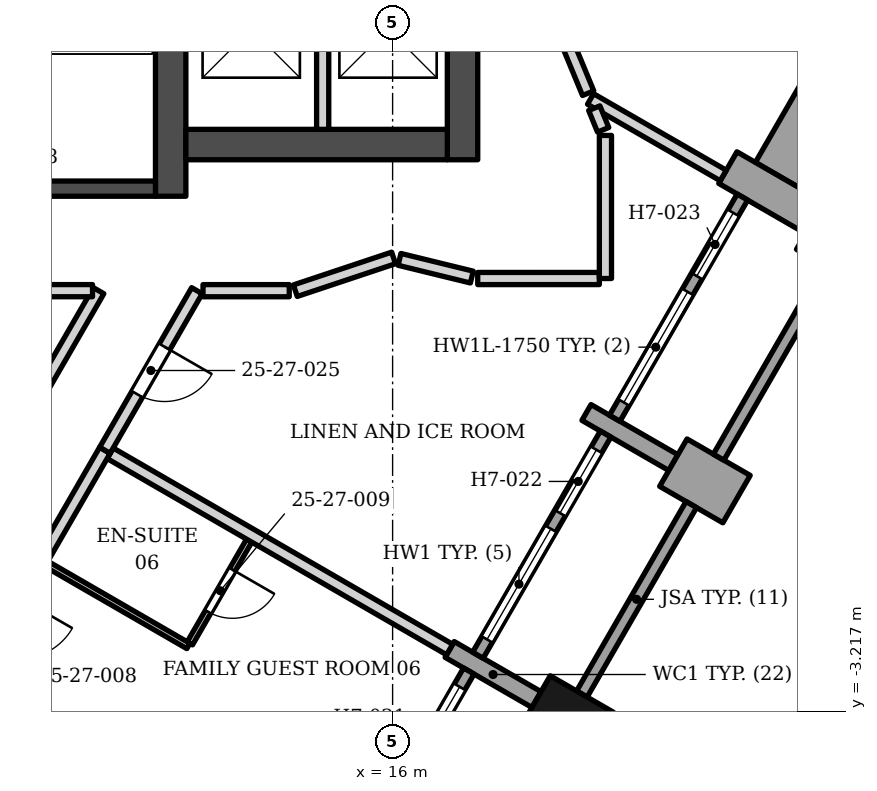
"""IFC4 building model, lengths in metres.
Left out: names, types, materials, properties, quantities, classifications, styles, units other than length and angle.
Written with IfcOpenShell. Run it as: python <this file> out.ifc"""

import sys

from ifc_helpers import new_model, si_unit, direction, frame, frame_2d, origin, origin_2d, place, context, subcontext, project, spatial, polyline, rectangle, outline, extrude, element, fill, save


model = new_model("IFC4")
c1 = context("Model", 3, precision=1e-05, world=origin(), true_north=direction((0.0, 1.0)))
c2 = subcontext(c1, "Body", "Model", "MODEL_VIEW")
j1 = project(units=[si_unit("LENGTHUNIT", "METRE"), si_unit("PLANEANGLEUNIT", "RADIAN")], contexts=[c1])
p1 = place(None, origin())
s1 = spatial("IfcSite", under=j1, at=p1, CompositionType="ELEMENT")
p2 = place(p1, origin())
s2 = spatial("IfcBuilding", under=s1, at=p2, CompositionType="ELEMENT")
p3 = place(p2, frame((0.0, 0.0, 112.2)))
s3 = spatial("IfcBuildingStorey", under=s2, at=p3, CompositionType="ELEMENT", Elevation=112.2)
p4 = place(p3, frame((12.35, 5.253, 0.0), z_axis=(0.0, 0.0, 1.0), x_axis=(0.0, 1.0, 0.0)))
e1 = element("IfcWall", 1, at=p4, inside=s3, PredefinedType="SHEAR", context=c2, shape_type="SweptSolid", body=[
    extrude(rectangle(XDim=13.3, YDim=0.5, at=frame_2d((6.65, 0.0))), origin(), (0.0, 0.0, 1.0), 3.4),
])
p5 = place(p3, frame((8.35, 5.378, 0.0), z_axis=(0.0, 0.0, 1.0), x_axis=(1.0, 0.0, 0.0)))
e2 = element("IfcWall", 2, at=p5, inside=s3, PredefinedType="SHEAR", context=c2, shape_type="SweptSolid", body=[
    extrude(rectangle(XDim=3.75, YDim=0.25, at=frame_2d((1.875, 0.0))), origin(), (0.0, 0.0, 1.0), 3.4),
])
p6 = place(p3, frame((12.6, 6.103, 0.0), z_axis=(0.0, 0.0, 1.0), x_axis=(1.0, 0.0, 0.0)))
e3 = element("IfcWall", 3, at=p6, inside=s3, PredefinedType="SHEAR", context=c2, shape_type="SweptSolid", body=[
    extrude(rectangle(XDim=4.3, YDim=0.5, at=frame_2d((2.15, 0.0))), origin(), (0.0, 0.0, 1.0), 3.4),
])
p7 = place(p3, frame((17.15, 5.853, 0.0), z_axis=(0.0, 0.0, 1.0), x_axis=(0.0, 1.0, 0.0)))
e4 = element("IfcWall", 4, at=p7, inside=s3, PredefinedType="SHEAR", context=c2, shape_type="SweptSolid", body=[
    extrude(rectangle(XDim=13.2, YDim=0.5, at=frame_2d((6.6, 0.0))), origin(), (0.0, 0.0, 1.0), 3.4),
])
p8 = place(p7, frame((4.1, 0.0, 0.0)))
e5 = element("IfcOpeningElement", 5, at=p8, cuts=e4, PredefinedType="OPENING", context=c2, shape_type="SweptSolid", body=[
    extrude(rectangle(XDim=1.6, YDim=2.1, at=frame_2d((0.8, 1.05))), frame((0.0, 0.26, 0.0), z_axis=(0.0, -1.0, 0.0), x_axis=(1.0, 0.0, 0.0)), (0.0, 0.0, 1.0), 0.52),
])
p9 = place(p7, frame((10.15, 0.0, 0.0)))
e6 = element("IfcOpeningElement", 6, at=p9, cuts=e4, PredefinedType="OPENING", context=c2, shape_type="SweptSolid", body=[
    extrude(rectangle(XDim=0.9, YDim=2.1, at=frame_2d((0.45, 1.05))), frame((0.0, 0.26, 0.0), z_axis=(0.0, -1.0, 0.0), x_axis=(1.0, 0.0, 0.0)), (0.0, 0.0, 1.0), 0.52),
])
for number, where, z_axis, x_axis in (
    (7, (18.887, -3.323, 0.0), (0.0, 0.0, 1.0), (0.5, 0.866, 0.0)),
    (8, (23.387, 4.469, 0.0), (0.0, 0.0, 1.0), (0.5, 0.866, 0.0)),
):
    element("IfcColumn", number, at=place(p3, frame(where, z_axis=z_axis, x_axis=x_axis)), inside=s3, PredefinedType="COLUMN", context=c2, shape_type="SweptSolid", body=[
        extrude(rectangle(XDim=0.9, YDim=1.2, at=origin_2d()), origin(), (0.0, 0.0, 1.0), 3.4),
    ])
p10 = place(p3, frame((18.366, -3.025, 0.0), z_axis=(0.0, 0.0, 1.0), x_axis=(-0.866057395165, 0.499944585209, 0.0)))
e9 = element("IfcWall", 9, at=p10, inside=s3, PredefinedType="SOLIDWALL", context=c2, shape_type="SweptSolid", body=[
    extrude(rectangle(XDim=1.649, YDim=0.3, at=frame_2d((0.825, 0.0))), origin(), (0.0, 0.0, 1.0), 2.65),
])
p11 = place(p3, frame((21.656, 0.272, 0.0), z_axis=(0.0, 0.0, 1.0), x_axis=(-0.866094119867, 0.499880961361, 0.0)))
e10 = element("IfcWall", 10, at=p11, inside=s3, PredefinedType="SOLIDWALL", context=c2, shape_type="SweptSolid", body=[
    extrude(rectangle(XDim=1.2, YDim=0.9, at=frame_2d((0.6, 0.0))), origin(), (0.0, 0.0, 1.0), 2.63),
])
p12 = place(p3, frame((20.617, 0.872, 0.0), z_axis=(0.0, 0.0, 1.0), x_axis=(-0.866040211805, 0.499974350878, 0.0)))
e11 = element("IfcWall", 11, at=p12, inside=s3, PredefinedType="SOLIDWALL", context=c2, shape_type="SweptSolid", body=[
    extrude(rectangle(XDim=1.65, YDim=0.3, at=frame_2d((0.825, 0.0))), origin(), (0.0, 0.0, 1.0), 2.65),
])
p13 = place(p3, frame((22.942, 4.899, 0.0), z_axis=(0.0, 0.0, 1.0), x_axis=(-0.866003217194, 0.500038426333, 0.0)))
e12 = element("IfcWall", 12, at=p13, inside=s3, PredefinedType="SOLIDWALL", context=c2, shape_type="SweptSolid", body=[
    extrude(rectangle(XDim=1.65, YDim=0.6, at=frame_2d((0.825, 0.0))), origin(), (0.0, 0.0, 1.0), 2.45),
])
p14 = place(p3, frame((15.153, -6.192, 0.0), z_axis=(0.0, 0.0, 1.0), x_axis=(0.49998411664, 0.866034573852, 0.0)))
e13 = element("IfcWall", 13, at=p14, inside=s3, PredefinedType="ELEMENTEDWALL", context=c2, shape_type="SweptSolid", body=[
    extrude(rectangle(XDim=4.2, YDim=0.2, at=frame_2d((2.1, 0.0))), origin(), (0.0, 0.0, 1.0), 2.65),
])
p15 = place(p14, frame((0.3, 0.0, 0.6)))
e14 = element("IfcOpeningElement", 14, at=p15, cuts=e13, PredefinedType="OPENING", context=c2, shape_type="SweptSolid", body=[
    extrude(rectangle(XDim=2.1, YDim=1.8, at=frame_2d((1.05, 0.9))), frame((0.0, 0.11, 0.0), z_axis=(0.0, -1.0, 0.0), x_axis=(1.0, 0.0, 0.0)), (0.0, 0.0, 1.0), 0.22),
])
p16 = place(p14, frame((2.7, 0.0, 0.0)))
e15 = element("IfcOpeningElement", 15, at=p16, cuts=e13, PredefinedType="OPENING", context=c2, shape_type="SweptSolid", body=[
    extrude(rectangle(XDim=1.2, YDim=2.4, at=frame_2d((0.6, 1.2))), frame((0.0, 0.11, 0.0), z_axis=(0.0, -1.0, 0.0), x_axis=(1.0, 0.0, 0.0)), (0.0, 0.0, 1.0), 0.22),
])
p17 = place(p3, origin())
e16 = element("IfcWall", 16, at=p17, inside=s3, PredefinedType="SOLIDWALL", context=c2, shape_type="SweptSolid", body=[
    extrude(outline(polyline([(20.825, 0.232), (19.026, -2.884), (19.199, -2.984), (20.999, 0.132), (20.825, 0.232)])), origin(), (0.0, 0.0, 1.0), 2.63),
])
p18 = place(p3, frame((17.403, -2.295, 0.0), z_axis=(0.0, 0.0, 1.0), x_axis=(0.499958946799, 0.866049104564, 0.0)))
e17 = element("IfcWall", 17, at=p18, inside=s3, PredefinedType="ELEMENTEDWALL", context=c2, shape_type="SweptSolid", body=[
    extrude(rectangle(XDim=4.2, YDim=0.2, at=frame_2d((2.1, 0.0))), origin(), (0.0, 0.0, 1.0), 2.65),
])
p19 = place(p18, frame((0.3, 0.0, 0.6)))
e18 = element("IfcOpeningElement", 18, at=p19, cuts=e17, PredefinedType="OPENING", context=c2, shape_type="SweptSolid", body=[
    extrude(rectangle(XDim=2.1, YDim=1.8, at=frame_2d((1.05, 0.9))), frame((0.0, 0.11, 0.0), z_axis=(0.0, -1.0, 0.0), x_axis=(1.0, 0.0, 0.0)), (0.0, 0.0, 1.0), 0.22),
])
p20 = place(p18, frame((2.7, 0.0, 0.0)))
e19 = element("IfcOpeningElement", 19, at=p20, cuts=e17, PredefinedType="OPENING", context=c2, shape_type="SweptSolid", body=[
    extrude(rectangle(XDim=1.2, YDim=2.4, at=frame_2d((0.6, 1.2))), frame((0.0, 0.11, 0.0), z_axis=(0.0, -1.0, 0.0), x_axis=(1.0, 0.0, 0.0)), (0.0, 0.0, 1.0), 0.22),
])
p21 = place(p3, frame((21.362, 0.962, 0.0), z_axis=(0.0, 0.0, 1.0), x_axis=(0.500012057535, 0.866018442252, 0.0)))
e20 = element("IfcWall", 20, at=p21, inside=s3, PredefinedType="SOLIDWALL", context=c2, shape_type="SweptSolid", body=[
    extrude(rectangle(XDim=3.6, YDim=0.2, at=frame_2d((1.8, 0.0))), origin(), (0.0, 0.0, 1.0), 2.63),
])
p22 = place(p3, frame((19.653, 1.602, 0.0), z_axis=(0.0, 0.0, 1.0), x_axis=(0.49998411664, 0.866034573852, 0.0)))
e21 = element("IfcWall", 21, at=p22, inside=s3, PredefinedType="ELEMENTEDWALL", context=c2, shape_type="SweptSolid", body=[
    extrude(rectangle(XDim=4.2, YDim=0.2, at=frame_2d((2.1, 0.0))), origin(), (0.0, 0.0, 1.0), 2.45),
])
p23 = place(p22, frame((0.3, 0.0, 0.6)))
e22 = element("IfcOpeningElement", 22, at=p23, cuts=e21, PredefinedType="OPENING", context=c2, shape_type="SweptSolid", body=[
    extrude(rectangle(XDim=2.1, YDim=1.75, at=frame_2d((1.05, 0.875))), frame((0.0, 0.11, 0.0), z_axis=(0.0, -1.0, 0.0), x_axis=(1.0, 0.0, 0.0)), (0.0, 0.0, 1.0), 0.22),
])
p24 = place(p22, frame((2.7, 0.0, 0.0)))
e23 = element("IfcOpeningElement", 23, at=p24, cuts=e21, PredefinedType="OPENING", context=c2, shape_type="SweptSolid", body=[
    extrude(rectangle(XDim=1.2, YDim=2.35, at=frame_2d((0.6, 1.175))), frame((0.0, 0.11, 0.0), z_axis=(0.0, -1.0, 0.0), x_axis=(1.0, 0.0, 0.0)), (0.0, 0.0, 1.0), 0.22),
])
p25 = place(p3, origin())
e24 = element("IfcWall", 24, at=p25, inside=s3, PredefinedType="SOLIDWALL", context=c2, shape_type="SweptSolid", body=[
    extrude(outline(polyline([(21.966, 5.809), (23.092, 5.159), (23.092, 5.159), (24.132, 4.559), (25.326, 6.628), (23.161, 7.878), (21.966, 5.809)])), origin(), (0.0, 0.0, 1.0), 2.552),
])
p26 = place(p3, frame((14.85, 6.353, 0.0), z_axis=(0.0, 0.0, 1.0), x_axis=(0.0, 1.0, 0.0)))
e25 = element("IfcWall", 25, at=p26, inside=s3, PredefinedType="SOLIDWALL", context=c2, shape_type="SweptSolid", body=[
    extrude(rectangle(XDim=2.5, YDim=0.2, at=frame_2d((1.25, 0.0))), origin(), (0.0, 0.0, 1.0), 3.23),
])
p27 = place(p3, frame((6.348, -4.639, 0.0), z_axis=(0.0, 0.0, 1.0), x_axis=(0.500160597015, 0.865932663198, 0.0)))
e26 = element("IfcWall", 26, at=p27, inside=s3, PredefinedType="PARTITIONING", context=c2, shape_type="SweptSolid", body=[
    extrude(rectangle(XDim=9.63, YDim=0.2, at=frame_2d((4.815, 0.0))), origin(), (0.0, 0.0, 1.0), 2.552),
])
p28 = place(p27, frame((4.315, 0.0, 0.0)))
e27 = element("IfcOpeningElement", 27, at=p28, cuts=e26, PredefinedType="OPENING", context=c2, shape_type="SweptSolid", body=[
    extrude(rectangle(XDim=1.0, YDim=2.1, at=frame_2d((0.5, 1.05))), frame((0.0, 0.11, 0.0), z_axis=(0.0, -1.0, 0.0), x_axis=(1.0, 0.0, 0.0)), (0.0, 0.0, 1.0), 0.22),
])
p29 = place(p3, frame((9.104, -2.871, 0.0), z_axis=(0.0, 0.0, 1.0), x_axis=(0.865901871826, -0.500213902613, 0.0)))
e28 = element("IfcWall", 28, at=p29, inside=s3, PredefinedType="PARTITIONING", context=c2, shape_type="SweptSolid", body=[
    extrude(rectangle(XDim=6.45, YDim=0.2, at=frame_2d((3.225, 0.0))), origin(), (0.0, 0.0, 1.0), 2.384),
])
p30 = place(p29, frame((4.25, 0.0, 0.0)))
e29 = element("IfcOpeningElement", 29, at=p30, cuts=e28, PredefinedType="OPENING", context=c2, shape_type="SweptSolid", body=[
    extrude(rectangle(XDim=0.9, YDim=2.1, at=frame_2d((0.45, 1.05))), frame((0.0, 0.11, 0.0), z_axis=(0.0, -1.0, 0.0), x_axis=(1.0, 0.0, 0.0)), (0.0, 0.0, 1.0), 0.22),
])
p31 = place(p3, frame((12.666, -2.101, 0.0), z_axis=(0.0, 0.0, 1.0), x_axis=(0.49995005938, 0.866054235095, 0.0)))
e30 = element("IfcWall", 30, at=p31, inside=s3, PredefinedType="PARTITIONING", context=c2, shape_type="SweptSolid", body=[
    extrude(rectangle(XDim=1.95, YDim=0.1, at=frame_2d((0.975, 0.0))), origin(), (0.0, 0.0, 1.0), 2.384),
])
p32 = place(p31, frame((0.6, 0.0, 0.0)))
e31 = element("IfcOpeningElement", 31, at=p32, cuts=e30, PredefinedType="OPENING", context=c2, shape_type="SweptSolid", body=[
    extrude(rectangle(XDim=0.8, YDim=2.1, at=frame_2d((0.4, 1.05))), frame((0.0, 0.06, 0.0), z_axis=(0.0, -1.0, 0.0), x_axis=(1.0, 0.0, 0.0)), (0.0, 0.0, 1.0), 0.12),
])
p33 = place(p3, frame((10.303, -0.792, 0.0), z_axis=(0.0, 0.0, 1.0), x_axis=(0.86571095196, -0.500544251447, 0.0)))
e32 = element("IfcWall", 32, at=p33, inside=s3, PredefinedType="PARTITIONING", context=c2, shape_type="SweptSolid", body=[
    extrude(rectangle(XDim=2.7, YDim=0.1, at=frame_2d((1.35, 0.0))), origin(), (0.0, 0.0, 1.0), 3.23),
])
p34 = place(p3, frame((11.355, 1.025, 0.0), z_axis=(0.0, 0.0, 1.0), x_axis=(0.865748417306, -0.500479448062, 0.0)))
e33 = element("IfcWall", 33, at=p34, inside=s3, PredefinedType="PARTITIONING", context=c2, shape_type="SweptSolid", body=[
    extrude(rectangle(XDim=6.448, YDim=0.2, at=frame_2d((3.224, 0.0))), origin(), (0.0, 0.0, 1.0), 2.384),
])
p35 = place(p3, frame((0.018, -18.412, 0.0), z_axis=(0.0, 0.0, 1.0), x_axis=(0.49999953585, 0.866025671762, 0.0)))
e34 = element("IfcWall", 34, at=p35, inside=s3, PredefinedType="PARTITIONING", context=c2, shape_type="SweptSolid", body=[
    extrude(rectangle(XDim=22.5, YDim=0.2, at=frame_2d((11.25, 0.0))), origin(), (0.0, 0.0, 1.0), 2.374),
])
p36 = place(p35, frame((4.0, 0.0, 0.0)))
e35 = element("IfcOpeningElement", 35, at=p36, cuts=e34, PredefinedType="OPENING", context=c2, shape_type="SweptSolid", body=[
    extrude(rectangle(XDim=1.0, YDim=2.1, at=frame_2d((0.5, 1.05))), frame((0.0, 0.11, 0.0), z_axis=(0.0, -1.0, 0.0), x_axis=(1.0, 0.0, 0.0)), (0.0, 0.0, 1.0), 0.22),
])
p37 = place(p35, frame((9.5, 0.0, 0.0)))
e36 = element("IfcOpeningElement", 36, at=p37, cuts=e34, PredefinedType="OPENING", context=c2, shape_type="SweptSolid", body=[
    extrude(rectangle(XDim=1.1, YDim=2.1, at=frame_2d((0.55, 1.05))), frame((0.0, 0.11, 0.0), z_axis=(0.0, -1.0, 0.0), x_axis=(1.0, 0.0, 0.0)), (0.0, 0.0, 1.0), 0.22),
])
p38 = place(p35, frame((16.3, 0.0, 0.0)))
e37 = element("IfcOpeningElement", 37, at=p38, cuts=e34, PredefinedType="OPENING", context=c2, shape_type="SweptSolid", body=[
    extrude(rectangle(XDim=1.0, YDim=2.1, at=frame_2d((0.5, 1.05))), frame((0.0, 0.11, 0.0), z_axis=(0.0, -1.0, 0.0), x_axis=(1.0, 0.0, 0.0)), (0.0, 0.0, 1.0), 0.22),
])
p39 = place(p35, frame((18.7, 0.0, 0.0)))
e38 = element("IfcOpeningElement", 38, at=p39, cuts=e34, PredefinedType="OPENING", context=c2, shape_type="SweptSolid", body=[
    extrude(rectangle(XDim=1.0, YDim=2.1, at=frame_2d((0.5, 1.05))), frame((0.0, 0.11, 0.0), z_axis=(0.0, -1.0, 0.0), x_axis=(1.0, 0.0, 0.0)), (0.0, 0.0, 1.0), 0.22),
])
p40 = place(p3, frame((6.0, 3.7, 0.0), z_axis=(0.0, 0.0, 1.0), x_axis=(1.0, 0.0, 0.0)))
e39 = element("IfcWall", 39, at=p40, inside=s3, PredefinedType="PARTITIONING", context=c2, shape_type="SweptSolid", body=[
    extrude(rectangle(XDim=5.065, YDim=0.2, at=frame_2d((2.532, 0.0))), origin(), (0.0, 0.0, 1.0), 2.832),
])
p41 = place(p3, frame((11.269, 1.075, 0.0), z_axis=(0.0, 0.0, 1.0), x_axis=(0.499554983499, 0.866282181775, 0.0)))
e40 = element("IfcWall", 40, at=p41, inside=s3, PredefinedType="PARTITIONING", context=c2, shape_type="SweptSolid", body=[
    extrude(rectangle(XDim=3.029, YDim=0.2, at=frame_2d((1.515, 0.0))), origin(), (0.0, 0.0, 1.0), 3.23),
])
p42 = place(p41, frame((1.064, 0.0, 0.0)))
e41 = element("IfcOpeningElement", 41, at=p42, cuts=e40, PredefinedType="OPENING", context=c2, shape_type="SweptSolid", body=[
    extrude(rectangle(XDim=0.9, YDim=2.1, at=frame_2d((0.45, 1.05))), frame((0.0, 0.11, 0.0), z_axis=(0.0, -1.0, 0.0), x_axis=(1.0, 0.0, 0.0)), (0.0, 0.0, 1.0), 0.22),
])
p43 = place(p3, frame((12.882, 3.699, 0.0), z_axis=(0.0, 0.0, 1.0), x_axis=(1.0, 0.0, 0.0)))
e42 = element("IfcWall", 42, at=p43, inside=s3, PredefinedType="PARTITIONING", context=c2, shape_type="SweptSolid", body=[
    extrude(rectangle(XDim=1.418, YDim=0.2, at=frame_2d((0.709, 0.0))), origin(), (0.0, 0.0, 1.0), 2.384),
])
p44 = place(p3, frame((17.4, 3.899, 0.0), z_axis=(0.0, 0.0, 1.0), x_axis=(0.999999992551, 0.000122055412, 0.0)))
e43 = element("IfcWall", 43, at=p44, inside=s3, PredefinedType="PARTITIONING", context=c2, shape_type="SweptSolid", body=[
    extrude(rectangle(XDim=2.0, YDim=0.2, at=frame_2d((1.0, 0.0))), origin(), (0.0, 0.0, 1.0), 3.23),
])
p45 = place(p3, frame((16.113, 4.214, 0.0), z_axis=(0.0, 0.0, 1.0), x_axis=(0.971349931971, -0.237653760039, 0.0)))
e44 = element("IfcWall", 44, at=p45, inside=s3, PredefinedType="PARTITIONING", context=c2, shape_type="SweptSolid", body=[
    extrude(rectangle(XDim=1.225, YDim=0.2, at=frame_2d((0.612, 0.0))), origin(), (0.0, 0.0, 1.0), 3.23),
])
p46 = place(p3, frame((14.4, 3.699, 0.0), z_axis=(0.0, 0.0, 1.0), x_axis=(0.948654629562, 0.31631375849, 0.0)))
e45 = element("IfcWall", 45, at=p46, inside=s3, PredefinedType="PARTITIONING", context=c2, shape_type="SweptSolid", body=[
    extrude(rectangle(XDim=1.703, YDim=0.2, at=frame_2d((0.852, 0.0))), origin(), (0.0, 0.0, 1.0), 3.23),
])
p47 = place(p3, frame((19.255, 6.852, 0.0), z_axis=(0.0, 0.0, 1.0), x_axis=(0.866364592695, -0.499412046835, 0.0)))
e46 = element("IfcWall", 46, at=p47, inside=s3, PredefinedType="PARTITIONING", context=c2, shape_type="SweptSolid", body=[
    extrude(rectangle(XDim=2.52, YDim=0.2, at=frame_2d((1.26, 0.0))), origin(), (0.0, 0.0, 1.0), 3.23),
])
p48 = place(p3, frame((19.5, 3.9, 0.0), z_axis=(0.0, 0.0, 1.0), x_axis=(0.000103755965, 0.999999994617, 0.0)))
e47 = element("IfcWall", 47, at=p48, inside=s3, PredefinedType="PARTITIONING", context=c2, shape_type="SweptSolid", body=[
    extrude(rectangle(XDim=2.353, YDim=0.2, at=frame_2d((1.177, 0.0))), origin(), (0.0, 0.0, 1.0), 2.45),
])
p49 = place(p3, frame((19.317, 6.701, 0.0), z_axis=(0.0, 0.0, 1.0), x_axis=(0.378608110245, -0.925557074878, 0.0)))
e48 = element("IfcWall", 48, at=p49, inside=s3, PredefinedType="PARTITIONING", context=c2, shape_type="SweptSolid", body=[
    extrude(rectangle(XDim=0.384, YDim=0.2, at=frame_2d((0.192, 0.0))), origin(), (0.0, 0.0, 1.0), 3.23),
])
p50 = place(p3, frame((18.801, 7.953, 0.0), z_axis=(0.0, 0.0, 1.0), x_axis=(0.381856038323, -0.924221816447, 0.0)))
e49 = element("IfcWall", 49, at=p50, inside=s3, PredefinedType="PARTITIONING", context=c2, shape_type="SweptSolid", body=[
    extrude(rectangle(XDim=1.088, YDim=0.2, at=frame_2d((0.544, 0.0))), origin(), (0.0, 0.0, 1.0), 3.23),
])
p51 = place(p16, origin())
e50 = element("IfcDoor", 50, at=p51, inside=s3, OperationType="SINGLE_SWING_LEFT", PredefinedType="DOOR", context=c2, shape_type="SweptSolid", body=[
    extrude(rectangle(XDim=1.2, YDim=2.4, at=frame_2d((0.6, 1.2))), frame((0.0, 0.025, 0.0), z_axis=(0.0, -1.0, 0.0), x_axis=(1.0, 0.0, 0.0)), (0.0, 0.0, 1.0), 0.05),
])
fill(e15, e50)
p52 = place(p19, origin())
e51 = element("IfcWindow", 51, at=p52, inside=s3, PartitioningType="SINGLE_PANEL", PredefinedType="WINDOW", context=c2, shape_type="SweptSolid", body=[
    extrude(rectangle(XDim=2.1, YDim=1.8, at=frame_2d((1.05, 0.9))), frame((0.0, 0.03, 0.0), z_axis=(0.0, -1.0, 0.0), x_axis=(1.0, 0.0, 0.0)), (0.0, 0.0, 1.0), 0.06),
])
fill(e18, e51)
p53 = place(p20, origin())
e52 = element("IfcDoor", 52, at=p53, inside=s3, OperationType="SINGLE_SWING_LEFT", PredefinedType="DOOR", context=c2, shape_type="SweptSolid", body=[
    extrude(rectangle(XDim=1.2, YDim=2.4, at=frame_2d((0.6, 1.2))), frame((0.0, 0.025, 0.0), z_axis=(0.0, -1.0, 0.0), x_axis=(1.0, 0.0, 0.0)), (0.0, 0.0, 1.0), 0.05),
])
fill(e19, e52)
p54 = place(p23, origin())
e53 = element("IfcWindow", 53, at=p54, inside=s3, PartitioningType="SINGLE_PANEL", PredefinedType="WINDOW", context=c2, shape_type="SweptSolid", body=[
    extrude(rectangle(XDim=2.1, YDim=1.75, at=frame_2d((1.05, 0.875))), frame((0.0, 0.03, 0.0), z_axis=(0.0, -1.0, 0.0), x_axis=(1.0, 0.0, 0.0)), (0.0, 0.0, 1.0), 0.06),
])
fill(e22, e53)
p55 = place(p24, origin())
e54 = element("IfcDoor", 54, at=p55, inside=s3, OperationType="SINGLE_SWING_LEFT", PredefinedType="DOOR", context=c2, shape_type="SweptSolid", body=[
    extrude(rectangle(XDim=1.2, YDim=2.35, at=frame_2d((0.6, 1.175))), frame((0.0, 0.025, 0.0), z_axis=(0.0, -1.0, 0.0), x_axis=(1.0, 0.0, 0.0)), (0.0, 0.0, 1.0), 0.05),
])
fill(e23, e54)
p56 = place(p32, origin())
e55 = element("IfcDoor", 55, at=p56, inside=s3, OperationType="SINGLE_SWING_RIGHT", PredefinedType="DOOR", context=c2, shape_type="SweptSolid", body=[
    extrude(rectangle(XDim=0.8, YDim=2.1, at=frame_2d((0.4, 1.05))), frame((0.0, 0.025, 0.0), z_axis=(0.0, -1.0, 0.0), x_axis=(1.0, 0.0, 0.0)), (0.0, 0.0, 1.0), 0.05),
])
fill(e31, e55)
p57 = place(p42, origin())
e56 = element("IfcDoor", 56, at=p57, inside=s3, OperationType="SINGLE_SWING_RIGHT", PredefinedType="DOOR", context=c2, shape_type="SweptSolid", body=[
    extrude(rectangle(XDim=0.9, YDim=2.1, at=frame_2d((0.45, 1.05))), frame((0.0, 0.025, 0.0), z_axis=(0.0, -1.0, 0.0), x_axis=(1.0, 0.0, 0.0)), (0.0, 0.0, 1.0), 0.05),
])
fill(e41, e56)
save(model, sys.argv[1])
